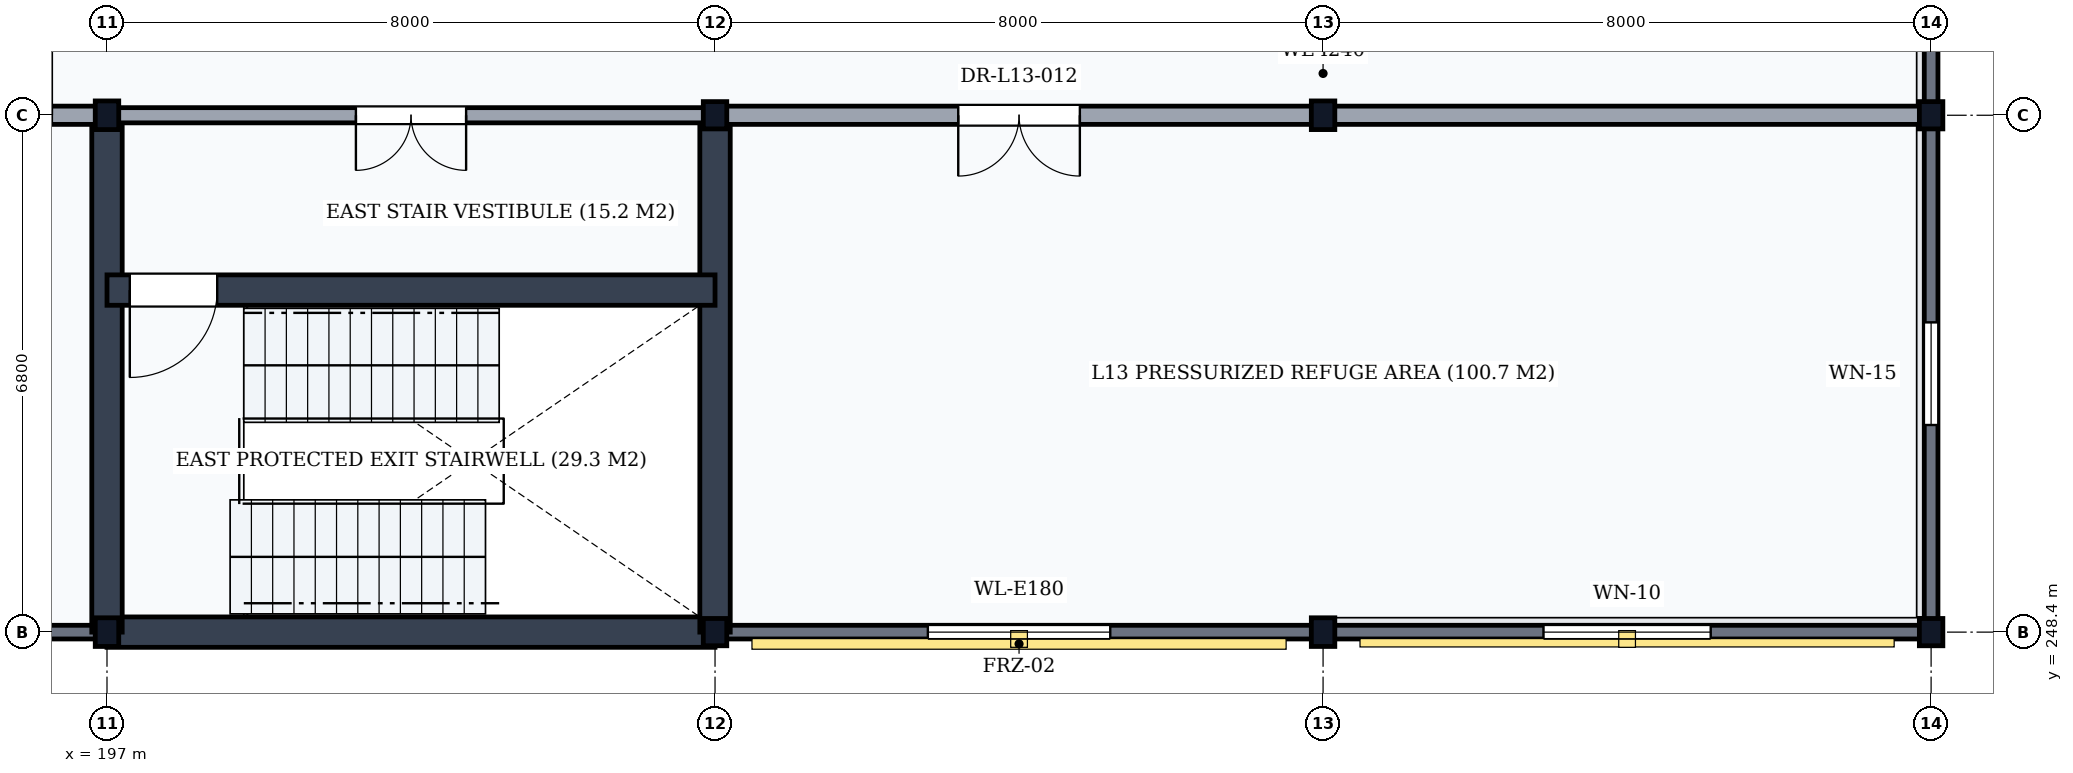
"""IFC4 building model, lengths in metres.
Left out: names, types, materials, properties, quantities, classifications, styles, units other than length and angle.
Written with IfcOpenShell. Run it as: python <this file> out.ifc"""

import sys

from ifc_helpers import new_model, si_unit, direction, frame, frame_2d, origin, origin_2d, place, context, subcontext, project, spatial, rectangle, i_section, extrude, element, fill, save


model = new_model("IFC4")
c1 = context("Model", 3, precision=1e-05, world=origin(), true_north=direction((0.0, 1.0)))
c2 = subcontext(c1, "Body", "Model", "MODEL_VIEW")
j1 = project(units=[si_unit("LENGTHUNIT", "METRE"), si_unit("PLANEANGLEUNIT", "RADIAN")], contexts=[c1])
p1 = place(None, origin())
s1 = spatial("IfcSite", under=j1, at=p1, CompositionType="ELEMENT")
p2 = place(p1, origin())
s2 = spatial("IfcBuilding", under=s1, at=p2, CompositionType="ELEMENT")
p3 = place(p2, frame((0.0, 0.0, 51.6)))
s3 = spatial("IfcBuildingStorey", under=s2, at=p3, CompositionType="ELEMENT", Elevation=51.6)
for number, where, z_axis, x_axis in (
    (1, (197.0, 248.4, 0.0), (0.0, 0.0, 1.0), (1.0, 0.0, 0.0)),
    (2, (197.0, 255.2, 0.0), (0.0, 0.0, 1.0), (1.0, 0.0, 0.0)),
):
    element("IfcColumn", number, at=place(p3, frame(where, z_axis=z_axis, x_axis=x_axis)), inside=s3, PredefinedType="COLUMN", context=c2, shape_type="SweptSolid", body=[
        extrude(i_section(OverallWidth=0.309, OverallDepth=0.377, WebThickness=0.021, FlangeThickness=0.04, FilletRadius=0.027, at=origin_2d()), origin(), (0.0, 0.0, 1.0), 4.5),
    ])
for number, where, z_axis, x_axis in (
    (3, (205.0, 248.4, 0.0), (0.0, 0.0, 1.0), (1.0, 0.0, 0.0)),
    (4, (205.0, 255.2, 0.0), (0.0, 0.0, 1.0), (1.0, 0.0, 0.0)),
):
    element("IfcColumn", number, at=place(p3, frame(where, z_axis=z_axis, x_axis=x_axis)), inside=s3, PredefinedType="COLUMN", context=c2, shape_type="SweptSolid", body=[
        extrude(i_section(OverallWidth=0.309, OverallDepth=0.359, WebThickness=0.021, FlangeThickness=0.04, FilletRadius=0.027, at=origin_2d()), origin(), (0.0, 0.0, 1.0), 4.5),
    ])
for number, where, z_axis, x_axis in (
    (5, (213.0, 248.4, 0.0), (0.0, 0.0, 1.0), (1.0, 0.0, 0.0)),
    (6, (213.0, 255.2, 0.0), (0.0, 0.0, 1.0), (1.0, 0.0, 0.0)),
):
    element("IfcColumn", number, at=place(p3, frame(where, z_axis=z_axis, x_axis=x_axis)), inside=s3, PredefinedType="COLUMN", context=c2, shape_type="SweptSolid", body=[
        extrude(i_section(OverallWidth=0.309, OverallDepth=0.377, WebThickness=0.021, FlangeThickness=0.04, FilletRadius=0.027, at=origin_2d()), origin(), (0.0, 0.0, 1.0), 4.5),
    ])
for number, where, z_axis, x_axis in (
    (7, (221.0, 248.4, 0.0), (0.0, 0.0, 1.0), (1.0, 0.0, 0.0)),
    (8, (221.0, 255.2, 0.0), (0.0, 0.0, 1.0), (1.0, 0.0, 0.0)),
):
    element("IfcColumn", number, at=place(p3, frame(where, z_axis=z_axis, x_axis=x_axis)), inside=s3, PredefinedType="COLUMN", context=c2, shape_type="SweptSolid", body=[
        extrude(i_section(OverallWidth=0.309, OverallDepth=0.359, WebThickness=0.021, FlangeThickness=0.04, FilletRadius=0.027, at=origin_2d()), origin(), (0.0, 0.0, 1.0), 4.5),
    ])
p4 = place(p3, frame((189.006, 248.4, 0.0), z_axis=(0.0, 0.0, 1.0), x_axis=(1.0, 0.0, 0.0)))
e9 = element("IfcWall", 9, at=p4, inside=s3, PredefinedType="SOLIDWALL", context=c2, shape_type="SweptSolid", body=[
    extrude(rectangle(XDim=7.988, YDim=0.18, at=frame_2d((3.994, 0.0))), origin(), (0.0, 0.0, 1.0), 3.868),
])
p5 = place(p3, frame((205.006, 248.4, 0.0), z_axis=(0.0, 0.0, 1.0), x_axis=(1.0, 0.0, 0.0)))
e10 = element("IfcWall", 10, at=p5, inside=s3, PredefinedType="SOLIDWALL", context=c2, shape_type="SweptSolid", body=[
    extrude(rectangle(XDim=7.988, YDim=0.18, at=frame_2d((3.994, 0.0))), origin(), (0.0, 0.0, 1.0), 3.868),
])
p6 = place(p5, frame((2.794, 0.0, 0.95)))
e11 = element("IfcOpeningElement", 11, at=p6, cuts=e10, PredefinedType="OPENING", context=c2, shape_type="SweptSolid", body=[
    extrude(rectangle(XDim=2.4, YDim=2.2, at=frame_2d((1.2, 1.1))), frame((0.0, 0.105, 0.0), z_axis=(0.0, -1.0, 0.0), x_axis=(1.0, 0.0, 0.0)), (0.0, 0.0, 1.0), 0.21),
])
p7 = place(p3, frame((213.006, 248.4, 0.0), z_axis=(0.0, 0.0, 1.0), x_axis=(1.0, 0.0, 0.0)))
e12 = element("IfcWall", 12, at=p7, inside=s3, PredefinedType="SOLIDWALL", context=c2, shape_type="SweptSolid", body=[
    extrude(rectangle(XDim=7.988, YDim=0.18, at=frame_2d((3.994, 0.0))), origin(), (0.0, 0.0, 1.0), 3.868),
])
p8 = place(p7, frame((2.894, 0.0, 0.95)))
e13 = element("IfcOpeningElement", 13, at=p8, cuts=e12, PredefinedType="OPENING", context=c2, shape_type="SweptSolid", body=[
    extrude(rectangle(XDim=2.2, YDim=2.1, at=frame_2d((1.1, 1.05))), frame((0.0, 0.105, 0.0), z_axis=(0.0, -1.0, 0.0), x_axis=(1.0, 0.0, 0.0)), (0.0, 0.0, 1.0), 0.21),
])
p9 = place(p3, frame((221.0, 248.406, 0.0), z_axis=(0.0, 0.0, 1.0), x_axis=(0.0, 1.0, 0.0)))
e14 = element("IfcWall", 14, at=p9, inside=s3, PredefinedType="SOLIDWALL", context=c2, shape_type="SweptSolid", body=[
    extrude(rectangle(XDim=6.788, YDim=0.18, at=frame_2d((3.394, 0.0))), origin(), (0.0, 0.0, 1.0), 4.018),
])
p10 = place(p9, frame((2.719, 0.0, 0.95)))
e15 = element("IfcOpeningElement", 15, at=p10, cuts=e14, PredefinedType="OPENING", context=c2, shape_type="SweptSolid", body=[
    extrude(rectangle(XDim=1.35, YDim=1.8, at=frame_2d((0.675, 0.9))), frame((0.0, 0.105, 0.0), z_axis=(0.0, -1.0, 0.0), x_axis=(1.0, 0.0, 0.0)), (0.0, 0.0, 1.0), 0.21),
])
p11 = place(p3, frame((221.0, 255.206, 0.0), z_axis=(0.0, 0.0, 1.0), x_axis=(0.0, 1.0, 0.0)))
e16 = element("IfcWall", 16, at=p11, inside=s3, PredefinedType="SOLIDWALL", context=c2, shape_type="SweptSolid", body=[
    extrude(rectangle(XDim=7.588, YDim=0.18, at=frame_2d((3.794, 0.0))), origin(), (0.0, 0.0, 1.0), 3.978),
])
p12 = place(p11, frame((4.466, 0.0, 0.95)))
e17 = element("IfcOpeningElement", 17, at=p12, cuts=e16, PredefinedType="OPENING", context=c2, shape_type="SweptSolid", body=[
    extrude(rectangle(XDim=1.2, YDim=1.8, at=frame_2d((0.6, 0.9))), frame((0.0, 0.105, 0.0), z_axis=(0.0, -1.0, 0.0), x_axis=(1.0, 0.0, 0.0)), (0.0, 0.0, 1.0), 0.21),
])
p13 = place(p3, frame((213.1, 248.5, 4.5), z_axis=(0.0, 0.0, 1.0), x_axis=(1.0, 0.0, 0.0)))
e18 = element("IfcWall", 18, at=p13, inside=s3, PredefinedType="PARAPET", context=c2, shape_type="SweptSolid", body=[
    extrude(rectangle(XDim=7.8, YDim=0.18, at=frame_2d((3.9, 0.0))), origin(), (0.0, 0.0, 1.0), 1.2),
])
p14 = place(p3, frame((220.9, 248.6, 4.5), z_axis=(0.0, 0.0, 1.0), x_axis=(0.0, 1.0, 0.0)))
e19 = element("IfcWall", 19, at=p14, inside=s3, PredefinedType="PARAPET", context=c2, shape_type="SweptSolid", body=[
    extrude(rectangle(XDim=36.8, YDim=0.18, at=frame_2d((18.4, 0.0))), origin(), (0.0, 0.0, 1.0), 1.2),
])
p15 = place(p3, frame((197.0, 248.4, 0.0), z_axis=(0.0, 0.0, 1.0), x_axis=(1.0, 0.0, 0.0)))
e20 = element("IfcWall", 20, at=p15, inside=s3, PredefinedType="SHEAR", context=c2, shape_type="SweptSolid", body=[
    extrude(rectangle(XDim=8.0, YDim=0.4, at=frame_2d((4.0, 0.0))), origin(), (0.0, 0.0, 1.0), 4.18),
])
for number, where, z_axis, x_axis in (
    (21, (197.0, 248.4, 0.0), (0.0, 0.0, 1.0), (0.0, 1.0, 0.0)),
    (22, (205.0, 248.4, 0.0), (0.0, 0.0, 1.0), (0.0, 1.0, 0.0)),
):
    element("IfcWall", number, at=place(p3, frame(where, z_axis=z_axis, x_axis=x_axis)), inside=s3, PredefinedType="SHEAR", context=c2, shape_type="SweptSolid", body=[
        extrude(rectangle(XDim=6.8, YDim=0.4, at=frame_2d((3.4, 0.0))), origin(), (0.0, 0.0, 1.0), 4.18),
    ])
p16 = place(p3, frame((197.0, 252.9, 0.0), z_axis=(0.0, 0.0, 1.0), x_axis=(1.0, 0.0, 0.0)))
e23 = element("IfcWall", 23, at=p16, inside=s3, PredefinedType="SHEAR", context=c2, shape_type="SweptSolid", body=[
    extrude(rectangle(XDim=8.0, YDim=0.4, at=frame_2d((4.0, 0.0))), origin(), (0.0, 0.0, 1.0), 4.18),
])
p17 = place(p16, frame((0.3, 0.0, 0.0)))
e24 = element("IfcOpeningElement", 24, at=p17, cuts=e23, PredefinedType="OPENING", context=c2, shape_type="SweptSolid", body=[
    extrude(rectangle(XDim=1.15, YDim=2.15, at=frame_2d((0.575, 1.075))), frame((0.0, 0.215, 0.0), z_axis=(0.0, -1.0, 0.0), x_axis=(1.0, 0.0, 0.0)), (0.0, 0.0, 1.0), 0.43),
])
p18 = place(p3, frame((197.0, 255.2, 0.0), z_axis=(0.0, 0.0, 1.0), x_axis=(1.0, 0.0, 0.0)))
e25 = element("IfcWall", 25, at=p18, inside=s3, PredefinedType="PARTITIONING", context=c2, shape_type="SweptSolid", body=[
    extrude(rectangle(XDim=8.0, YDim=0.2, at=frame_2d((4.0, 0.0))), origin(), (0.0, 0.0, 1.0), 3.678),
])
p19 = place(p18, frame((3.275, 0.0, 0.0)))
e26 = element("IfcOpeningElement", 26, at=p19, cuts=e25, PredefinedType="OPENING", context=c2, shape_type="SweptSolid", body=[
    extrude(rectangle(XDim=1.45, YDim=2.2, at=frame_2d((0.725, 1.1))), frame((0.0, 0.115, 0.0), z_axis=(0.0, -1.0, 0.0), x_axis=(1.0, 0.0, 0.0)), (0.0, 0.0, 1.0), 0.23),
])
p20 = place(p3, frame((189.0, 255.2, 0.0), z_axis=(0.0, 0.0, 1.0), x_axis=(1.0, 0.0, 0.0)))
e27 = element("IfcWall", 27, at=p20, inside=s3, PredefinedType="PARTITIONING", context=c2, shape_type="SweptSolid", body=[
    extrude(rectangle(XDim=8.0, YDim=0.24, at=frame_2d((4.0, 0.0))), origin(), (0.0, 0.0, 1.0), 3.678),
])
p21 = place(p20, frame((1.05, 0.0, 0.0)))
e28 = element("IfcOpeningElement", 28, at=p21, cuts=e27, PredefinedType="OPENING", context=c2, shape_type="SweptSolid", body=[
    extrude(rectangle(XDim=1.0, YDim=2.1, at=frame_2d((0.5, 1.05))), frame((0.0, 0.135, 0.0), z_axis=(0.0, -1.0, 0.0), x_axis=(1.0, 0.0, 0.0)), (0.0, 0.0, 1.0), 0.27),
])
p22 = place(p20, frame((3.6, 0.0, 0.0)))
e29 = element("IfcOpeningElement", 29, at=p22, cuts=e27, PredefinedType="OPENING", context=c2, shape_type="SweptSolid", body=[
    extrude(rectangle(XDim=1.5, YDim=2.25, at=frame_2d((0.75, 1.125))), frame((0.0, 0.135, 0.0), z_axis=(0.0, -1.0, 0.0), x_axis=(1.0, 0.0, 0.0)), (0.0, 0.0, 1.0), 0.27),
])
p23 = place(p20, frame((6.425, 0.0, 0.0)))
e30 = element("IfcOpeningElement", 30, at=p23, cuts=e27, PredefinedType="OPENING", context=c2, shape_type="SweptSolid", body=[
    extrude(rectangle(XDim=0.85, YDim=2.1, at=frame_2d((0.425, 1.05))), frame((0.0, 0.135, 0.0), z_axis=(0.0, -1.0, 0.0), x_axis=(1.0, 0.0, 0.0)), (0.0, 0.0, 1.0), 0.27),
])
p24 = place(p3, frame((205.0, 255.2, 0.0), z_axis=(0.0, 0.0, 1.0), x_axis=(1.0, 0.0, 0.0)))
e31 = element("IfcWall", 31, at=p24, inside=s3, PredefinedType="PARTITIONING", context=c2, shape_type="SweptSolid", body=[
    extrude(rectangle(XDim=16.0, YDim=0.24, at=frame_2d((8.0, 0.0))), origin(), (0.0, 0.0, 1.0), 3.678),
])
p25 = place(p24, frame((3.2, 0.0, 0.0)))
e32 = element("IfcOpeningElement", 32, at=p25, cuts=e31, PredefinedType="OPENING", context=c2, shape_type="SweptSolid", body=[
    extrude(rectangle(XDim=1.6, YDim=2.1, at=frame_2d((0.8, 1.05))), frame((0.0, 0.135, 0.0), z_axis=(0.0, -1.0, 0.0), x_axis=(1.0, 0.0, 0.0)), (0.0, 0.0, 1.0), 0.27),
])
p26 = place(p6, origin())
e33 = element("IfcWindow", 33, at=p26, inside=s3, PartitioningType="DOUBLE_PANEL_VERTICAL", PredefinedType="WINDOW", context=c2, shape_type="SweptSolid", body=[
    extrude(rectangle(XDim=2.4, YDim=2.2, at=frame_2d((1.2, 1.1))), frame((0.0, 0.03, 0.0), z_axis=(0.0, -1.0, 0.0), x_axis=(1.0, 0.0, 0.0)), (0.0, 0.0, 1.0), 0.06),
])
fill(e11, e33)
p27 = place(p8, origin())
e34 = element("IfcWindow", 34, at=p27, inside=s3, PartitioningType="DOUBLE_PANEL_VERTICAL", PredefinedType="WINDOW", context=c2, shape_type="SweptSolid", body=[
    extrude(rectangle(XDim=2.2, YDim=2.1, at=frame_2d((1.1, 1.05))), frame((0.0, 0.03, 0.0), z_axis=(0.0, -1.0, 0.0), x_axis=(1.0, 0.0, 0.0)), (0.0, 0.0, 1.0), 0.06),
])
fill(e13, e34)
p28 = place(p10, origin())
e35 = element("IfcWindow", 35, at=p28, inside=s3, PartitioningType="SINGLE_PANEL", PredefinedType="WINDOW", context=c2, shape_type="SweptSolid", body=[
    extrude(rectangle(XDim=1.35, YDim=1.8, at=frame_2d((0.675, 0.9))), frame((0.0, 0.03, 0.0), z_axis=(0.0, -1.0, 0.0), x_axis=(1.0, 0.0, 0.0)), (0.0, 0.0, 1.0), 0.06),
])
fill(e15, e35)
p29 = place(p17, frame((1.15, 0.0, 0.0), z_axis=(0.0, 0.0, 1.0), x_axis=(-1.0, 0.0, 0.0)))
e36 = element("IfcDoor", 36, at=p29, inside=s3, OperationType="SINGLE_SWING_RIGHT", PredefinedType="DOOR", context=c2, shape_type="SweptSolid", body=[
    extrude(rectangle(XDim=1.15, YDim=2.15, at=frame_2d((0.575, 1.075))), frame((0.0, 0.025, 0.0), z_axis=(0.0, -1.0, 0.0), x_axis=(1.0, 0.0, 0.0)), (0.0, 0.0, 1.0), 0.05),
])
fill(e24, e36)
p30 = place(p19, frame((1.45, 0.0, 0.0), z_axis=(0.0, 0.0, 1.0), x_axis=(-1.0, 0.0, 0.0)))
e37 = element("IfcDoor", 37, at=p30, inside=s3, OperationType="DOUBLE_DOOR_SINGLE_SWING", PredefinedType="DOOR", context=c2, shape_type="SweptSolid", body=[
    extrude(rectangle(XDim=1.45, YDim=2.2, at=frame_2d((0.725, 1.1))), frame((0.0, 0.025, 0.0), z_axis=(0.0, -1.0, 0.0), x_axis=(1.0, 0.0, 0.0)), (0.0, 0.0, 1.0), 0.05),
])
fill(e26, e37)
p31 = place(p25, frame((1.6, 0.0, 0.0), z_axis=(0.0, 0.0, 1.0), x_axis=(-1.0, 0.0, 0.0)))
e38 = element("IfcDoor", 38, at=p31, inside=s3, OperationType="DOUBLE_DOOR_SINGLE_SWING", PredefinedType="DOOR", context=c2, shape_type="SweptSolid", body=[
    extrude(rectangle(XDim=1.6, YDim=2.1, at=frame_2d((0.8, 1.05))), frame((0.0, 0.025, 0.0), z_axis=(0.0, -1.0, 0.0), x_axis=(1.0, 0.0, 0.0)), (0.0, 0.0, 1.0), 0.05),
])
fill(e32, e38)
save(model, sys.argv[1])
